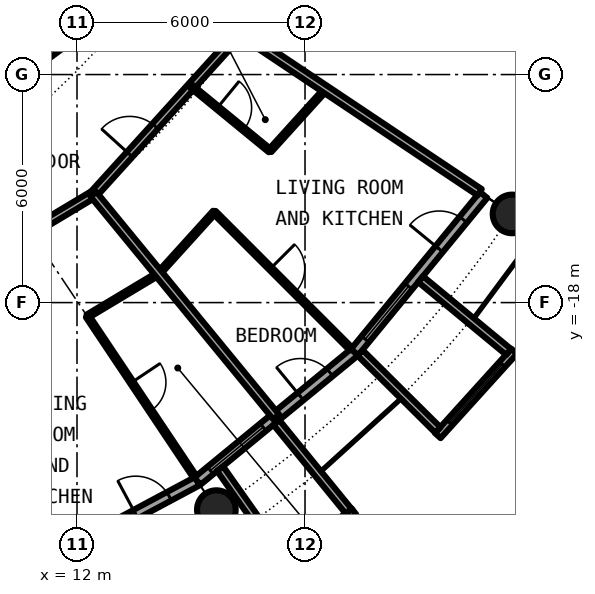
"""IFC4 building model, lengths in metres.
Left out: names, types, materials, properties, quantities, classifications, styles, units other than length and angle.
Written with IfcOpenShell. Run it as: python <this file> out.ifc"""

import sys

from ifc_helpers import new_model, si_unit, direction, frame, frame_2d, origin, origin_2d, place, context, subcontext, project, spatial, rectangle, circle, hollow_circle, extrude, element, fill, save


model = new_model("IFC4")
c1 = context("Model", 3, precision=1e-05, world=origin(), true_north=direction((0.0, 1.0)))
c2 = subcontext(c1, "Body", "Model", "MODEL_VIEW")
j1 = project(units=[si_unit("LENGTHUNIT", "METRE"), si_unit("PLANEANGLEUNIT", "RADIAN")], contexts=[c1])
p1 = place(None, origin())
s1 = spatial("IfcSite", under=j1, at=p1, CompositionType="ELEMENT")
p2 = place(p1, origin())
s2 = spatial("IfcBuilding", under=s1, at=p2, CompositionType="ELEMENT")
p3 = place(p2, frame((0.0, 0.0, 75.8)))
s3 = spatial("IfcBuildingStorey", under=s2, at=p3, CompositionType="ELEMENT", Elevation=75.8)
for number, where, z_axis, x_axis in (
    (1, (15.667, -23.448, 0.0), (0.0, 0.0, 1.0), (1.0, 0.0, 0.0)),
    (2, (23.448, -15.667, 0.0), (0.0, 0.0, 1.0), (1.0, 0.0, 0.0)),
):
    element("IfcColumn", number, at=place(p3, frame(where, z_axis=z_axis, x_axis=x_axis)), inside=s3, PredefinedType="COLUMN", context=c2, shape_type="SweptSolid", body=[
        extrude(hollow_circle(Radius=0.508, WallThickness=0.04, at=origin_2d()), origin(), (0.0, 0.0, 1.0), 3.05),
    ])
p4 = place(p3, frame((10.447, -25.222, 0.0), z_axis=(0.0, 0.0, 1.0), x_axis=(0.881915646801, 0.471407246368, 0.0)))
e3 = element("IfcWall", 3, at=p4, inside=s3, PredefinedType="SOLIDWALL", context=c2, shape_type="SweptSolid", body=[
    extrude(rectangle(XDim=5.352, YDim=0.25, at=frame_2d((2.676, 0.0))), origin(), (0.0, 0.0, 1.0), 2.7),
])
p5 = place(p4, frame((0.441, 0.0, 0.3)))
e4 = element("IfcOpeningElement", 4, at=p5, cuts=e3, PredefinedType="OPENING", context=c2, shape_type="SweptSolid", body=[
    extrude(rectangle(XDim=1.8, YDim=2.1, at=frame_2d((0.9, 1.05))), frame((0.0, 0.135, 0.0), z_axis=(0.0, -1.0, 0.0), x_axis=(1.0, 0.0, 0.0)), (0.0, 0.0, 1.0), 0.27),
])
p6 = place(p4, frame((3.51, 0.0, 0.0)))
e5 = element("IfcOpeningElement", 5, at=p6, cuts=e3, PredefinedType="OPENING", context=c2, shape_type="SweptSolid", body=[
    extrude(rectangle(XDim=1.0, YDim=2.2, at=frame_2d((0.5, 1.1))), frame((0.0, 0.135, 0.0), z_axis=(0.0, -1.0, 0.0), x_axis=(1.0, 0.0, 0.0)), (0.0, 0.0, 1.0), 0.27),
])
p7 = place(p3, frame((15.167, -22.699, 0.0), z_axis=(0.0, 0.0, 1.0), x_axis=(0.773019449054, 0.634382322723, 0.0)))
e6 = element("IfcWall", 6, at=p7, inside=s3, PredefinedType="SOLIDWALL", context=c2, shape_type="SweptSolid", body=[
    extrude(rectangle(XDim=5.352, YDim=0.25, at=frame_2d((2.676, 0.0))), origin(), (0.0, 0.0, 1.0), 2.7),
])
p8 = place(p7, frame((0.441, 0.0, 0.3)))
e7 = element("IfcOpeningElement", 7, at=p8, cuts=e6, PredefinedType="OPENING", context=c2, shape_type="SweptSolid", body=[
    extrude(rectangle(XDim=1.8, YDim=2.1, at=frame_2d((0.9, 1.05))), frame((0.0, 0.135, 0.0), z_axis=(0.0, -1.0, 0.0), x_axis=(1.0, 0.0, 0.0)), (0.0, 0.0, 1.0), 0.27),
])
p9 = place(p7, frame((3.51, 0.0, 0.0)))
e8 = element("IfcOpeningElement", 8, at=p9, cuts=e6, PredefinedType="OPENING", context=c2, shape_type="SweptSolid", body=[
    extrude(rectangle(XDim=1.0, YDim=2.2, at=frame_2d((0.5, 1.1))), frame((0.0, 0.135, 0.0), z_axis=(0.0, -1.0, 0.0), x_axis=(1.0, 0.0, 0.0)), (0.0, 0.0, 1.0), 0.27),
])
p10 = place(p3, frame((17.427, -24.909, -0.03), z_axis=(0.0, 0.0, 1.0), x_axis=(0.796842165306, 0.60418752353, 0.0)))
e9 = element("IfcWall", 9, at=p10, inside=s3, PredefinedType="SOLIDWALL", context=c2, shape_type="SweptSolid", body=[
    extrude(rectangle(XDim=2.337, YDim=0.2, at=frame_2d((1.168, 0.0))), origin(), (0.0, 0.0, 1.0), 2.73),
])
p11 = place(p10, frame((0.128, 0.0, 0.33)))
e10 = element("IfcOpeningElement", 10, at=p11, cuts=e9, PredefinedType="OPENING", context=c2, shape_type="SweptSolid", body=[
    extrude(circle(Radius=1.04, at=frame_2d((1.04, 1.04))), frame((0.0, 0.11, 0.0), z_axis=(0.0, -1.0, 0.0), x_axis=(1.0, 0.0, 0.0)), (0.0, 0.0, 1.0), 0.22),
])
p12 = place(p3, frame((15.765, -22.37, -0.03), z_axis=(0.0, 0.0, 1.0), x_axis=(0.576274612209, -0.817256123454, 0.0)))
e11 = element("IfcWall", 11, at=p12, inside=s3, PredefinedType="SOLIDWALL", context=c2, shape_type="SweptSolid", body=[
    extrude(rectangle(XDim=2.933, YDim=0.2, at=frame_2d((1.466, 0.0))), origin(), (0.0, 0.0, 1.0), 2.73),
])
p13 = place(p3, frame((17.246, -21.155, -0.03), z_axis=(0.0, 0.0, 1.0), x_axis=(0.631741648902, -0.775179004516, 0.0)))
e12 = element("IfcWall", 12, at=p13, inside=s3, PredefinedType="SOLIDWALL", context=c2, shape_type="SweptSolid", body=[
    extrude(rectangle(XDim=3.006, YDim=0.2, at=frame_2d((1.503, 0.0))), origin(), (0.0, 0.0, 1.0), 2.73),
])
p14 = place(p3, frame((19.304, -19.304, 0.0), z_axis=(0.0, 0.0, 1.0), x_axis=(0.634382322723, 0.773019449054, 0.0)))
e13 = element("IfcWall", 13, at=p14, inside=s3, PredefinedType="SOLIDWALL", context=c2, shape_type="SweptSolid", body=[
    extrude(rectangle(XDim=5.352, YDim=0.25, at=frame_2d((2.676, 0.0))), origin(), (0.0, 0.0, 1.0), 2.7),
])
p15 = place(p14, frame((0.441, 0.0, 0.3)))
e14 = element("IfcOpeningElement", 14, at=p15, cuts=e13, PredefinedType="OPENING", context=c2, shape_type="SweptSolid", body=[
    extrude(rectangle(XDim=1.8, YDim=2.1, at=frame_2d((0.9, 1.05))), frame((0.0, 0.135, 0.0), z_axis=(0.0, -1.0, 0.0), x_axis=(1.0, 0.0, 0.0)), (0.0, 0.0, 1.0), 0.27),
])
p16 = place(p14, frame((3.51, 0.0, 0.0)))
e15 = element("IfcOpeningElement", 15, at=p16, cuts=e13, PredefinedType="OPENING", context=c2, shape_type="SweptSolid", body=[
    extrude(rectangle(XDim=1.0, YDim=2.2, at=frame_2d((0.5, 1.1))), frame((0.0, 0.135, 0.0), z_axis=(0.0, -1.0, 0.0), x_axis=(1.0, 0.0, 0.0)), (0.0, 0.0, 1.0), 0.27),
])
p17 = place(p3, frame((21.493, -21.5, -0.03), z_axis=(0.0, 0.0, 1.0), x_axis=(0.671506829416, 0.740998365753, 0.0)))
e16 = element("IfcWall", 16, at=p17, inside=s3, PredefinedType="SOLIDWALL", context=c2, shape_type="SweptSolid", body=[
    extrude(rectangle(XDim=2.993, YDim=0.2, at=frame_2d((1.497, 0.0))), origin(), (0.0, 0.0, 1.0), 2.73),
])
p18 = place(p17, frame((0.457, 0.0, 0.33)))
e17 = element("IfcOpeningElement", 17, at=p18, cuts=e16, PredefinedType="OPENING", context=c2, shape_type="SweptSolid", body=[
    extrude(circle(Radius=1.04, at=frame_2d((1.04, 1.04))), frame((0.0, 0.11, 0.0), z_axis=(0.0, -1.0, 0.0), x_axis=(1.0, 0.0, 0.0)), (0.0, 0.0, 1.0), 0.22),
])
p19 = place(p3, frame((19.45, -19.323, -0.03), z_axis=(0.0, 0.0, 1.0), x_axis=(0.709727076896, -0.704476739375, 0.0)))
e18 = element("IfcWall", 18, at=p19, inside=s3, PredefinedType="SOLIDWALL", context=c2, shape_type="SweptSolid", body=[
    extrude(rectangle(XDim=2.883, YDim=0.2, at=frame_2d((1.441, 0.0))), origin(), (0.0, 0.0, 1.0), 2.73),
])
p20 = place(p3, frame((21.041, -17.384, -0.03), z_axis=(0.0, 0.0, 1.0), x_axis=(0.770784861449, -0.63709551667, 0.0)))
e19 = element("IfcWall", 19, at=p20, inside=s3, PredefinedType="SOLIDWALL", context=c2, shape_type="SweptSolid", body=[
    extrude(rectangle(XDim=3.006, YDim=0.2, at=frame_2d((1.503, 0.0))), origin(), (0.0, 0.0, 1.0), 2.73),
])
p21 = place(p3, frame((12.276, -18.36, 0.0), z_axis=(0.0, 0.0, 1.0), x_axis=(0.857611386679, 0.514298268943, 0.0)))
e20 = element("IfcWall", 20, at=p21, inside=s3, PredefinedType="PARTITIONING", context=c2, shape_type="SweptSolid", body=[
    extrude(rectangle(XDim=2.182, YDim=0.1, at=frame_2d((1.091, 0.0))), origin(), (0.0, 0.0, 1.0), 2.7),
])
p22 = place(p3, frame((14.153, -17.234, 0.0), z_axis=(0.0, 0.0, 1.0), x_axis=(0.671144831591, 0.741326254107, 0.0)))
e21 = element("IfcWall", 21, at=p22, inside=s3, PredefinedType="PARTITIONING", context=c2, shape_type="SweptSolid", body=[
    extrude(rectangle(XDim=2.181, YDim=0.1, at=frame_2d((1.091, 0.0))), origin(), (0.0, 0.0, 1.0), 2.7),
])
p23 = place(p3, frame((17.077, -14.006, 0.0), z_axis=(0.0, 0.0, 1.0), x_axis=(0.671396556615, 0.741098282123, 0.0)))
e22 = element("IfcWall", 22, at=p23, inside=s3, PredefinedType="PARTITIONING", context=c2, shape_type="SweptSolid", body=[
    extrude(rectangle(XDim=2.182, YDim=0.1, at=frame_2d((1.091, 0.0))), origin(), (0.0, 0.0, 1.0), 2.7),
])
p24 = place(p3, frame((10.916, -16.061, 0.0), z_axis=(0.0, 0.0, 1.0), x_axis=(0.857663265693, 0.514211748875, 0.0)))
e23 = element("IfcWall", 23, at=p24, inside=s3, PredefinedType="PARTITIONING", context=c2, shape_type="SweptSolid", body=[
    extrude(rectangle(XDim=1.77, YDim=0.2, at=frame_2d((0.885, 0.0))), origin(), (0.0, 0.0, 1.0), 2.38),
])
p25 = place(p3, frame((12.434, -15.151, 0.0), z_axis=(0.0, 0.0, 1.0), x_axis=(0.671601747072, 0.740912338492, 0.0)))
e24 = element("IfcWall", 24, at=p25, inside=s3, PredefinedType="PARTITIONING", context=c2, shape_type="SweptSolid", body=[
    extrude(rectangle(XDim=5.597, YDim=0.2, at=frame_2d((2.799, 0.0))), origin(), (0.0, 0.0, 1.0), 2.38),
])
p26 = place(p25, frame((1.417, 0.0, 0.0)))
e25 = element("IfcOpeningElement", 25, at=p26, cuts=e24, PredefinedType="OPENING", context=c2, shape_type="SweptSolid", body=[
    extrude(rectangle(XDim=1.0, YDim=2.3, at=frame_2d((0.5, 1.15))), frame((0.0, 0.11, 0.0), z_axis=(0.0, -1.0, 0.0), x_axis=(1.0, 0.0, 0.0)), (0.0, 0.0, 1.0), 0.22),
])
p27 = place(p3, frame((4.906, -16.172, 0.0), z_axis=(0.0, 0.0, 1.0), x_axis=(0.803191461888, 0.595720971219, 0.0)))
e26 = element("IfcWall", 26, at=p27, inside=s3, PredefinedType="PARTITIONING", context=c2, shape_type="SweptSolid", body=[
    extrude(rectangle(XDim=9.76, YDim=0.2, at=frame_2d((4.88, 0.0))), origin(), (0.0, 0.0, 1.0), 2.7),
])
p28 = place(p27, frame((4.38, 0.0, 0.0)))
e27 = element("IfcOpeningElement", 27, at=p28, cuts=e26, PredefinedType="OPENING", context=c2, shape_type="SweptSolid", body=[
    extrude(rectangle(XDim=1.0, YDim=2.3, at=frame_2d((0.5, 1.15))), frame((0.0, 0.11, 0.0), z_axis=(0.0, -1.0, 0.0), x_axis=(1.0, 0.0, 0.0)), (0.0, 0.0, 1.0), 0.22),
])
p29 = place(p3, frame((12.276, -18.36, 0.0), z_axis=(0.0, 0.0, 1.0), x_axis=(0.555939561221, -0.831222716406, 0.0)))
e28 = element("IfcWall", 28, at=p29, inside=s3, PredefinedType="PARTITIONING", context=c2, shape_type="SweptSolid", body=[
    extrude(rectangle(XDim=5.089, YDim=0.1, at=frame_2d((2.544, 0.0))), origin(), (0.0, 0.0, 1.0), 2.7),
])
p30 = place(p29, frame((2.094, 0.0, 0.0)))
e29 = element("IfcOpeningElement", 29, at=p30, cuts=e28, PredefinedType="OPENING", context=c2, shape_type="SweptSolid", body=[
    extrude(rectangle(XDim=0.9, YDim=2.3, at=frame_2d((0.45, 1.15))), frame((0.0, 0.06, 0.0), z_axis=(0.0, -1.0, 0.0), x_axis=(1.0, 0.0, 0.0)), (0.0, 0.0, 1.0), 0.12),
])
p31 = place(p3, frame((12.434, -15.151, 0.0), z_axis=(0.0, 0.0, 1.0), x_axis=(0.634381303318, -0.773020285633, 0.0)))
e30 = element("IfcWall", 30, at=p31, inside=s3, PredefinedType="PARTITIONING", context=c2, shape_type="SweptSolid", body=[
    extrude(rectangle(XDim=7.576, YDim=0.2, at=frame_2d((3.788, 0.0))), origin(), (0.0, 0.0, 1.0), 2.7),
])
p32 = place(p3, frame((15.009, -12.31, 0.0), z_axis=(0.0, 0.0, 1.0), x_axis=(0.77319617123, -0.634166918717, 0.0)))
e31 = element("IfcWall", 31, at=p32, inside=s3, PredefinedType="PARTITIONING", context=c2, shape_type="SweptSolid", body=[
    extrude(rectangle(XDim=2.675, YDim=0.1, at=frame_2d((1.337, 0.0))), origin(), (0.0, 0.0, 1.0), 2.7),
])
p33 = place(p32, frame((0.887, 0.0, 0.0)))
e32 = element("IfcOpeningElement", 32, at=p33, cuts=e31, PredefinedType="OPENING", context=c2, shape_type="SweptSolid", body=[
    extrude(rectangle(XDim=0.9, YDim=2.3, at=frame_2d((0.45, 1.15))), frame((0.0, 0.06, 0.0), z_axis=(0.0, -1.0, 0.0), x_axis=(1.0, 0.0, 0.0)), (0.0, 0.0, 1.0), 0.12),
])
p34 = place(p3, frame((15.612, -15.622, 0.0), z_axis=(0.0, 0.0, 1.0), x_axis=(0.706914880313, -0.707298629994, 0.0)))
e33 = element("IfcWall", 33, at=p34, inside=s3, PredefinedType="PARTITIONING", context=c2, shape_type="SweptSolid", body=[
    extrude(rectangle(XDim=5.09, YDim=0.1, at=frame_2d((2.545, 0.0))), origin(), (0.0, 0.0, 1.0), 2.7),
])
p35 = place(p34, frame((2.095, 0.0, 0.0)))
e34 = element("IfcOpeningElement", 34, at=p35, cuts=e33, PredefinedType="OPENING", context=c2, shape_type="SweptSolid", body=[
    extrude(rectangle(XDim=0.9, YDim=2.3, at=frame_2d((0.45, 1.15))), frame((0.0, 0.06, 0.0), z_axis=(0.0, -1.0, 0.0), x_axis=(1.0, 0.0, 0.0)), (0.0, 0.0, 1.0), 0.12),
])
p36 = place(p3, frame((16.515, -11.035, 0.0), z_axis=(0.0, 0.0, 1.0), x_axis=(0.831505405283, -0.555516661303, 0.0)))
e35 = element("IfcWall", 35, at=p36, inside=s3, PredefinedType="PARTITIONING", context=c2, shape_type="SweptSolid", body=[
    extrude(rectangle(XDim=7.312, YDim=0.2, at=frame_2d((3.656, 0.0))), origin(), (0.0, 0.0, 1.0), 2.7),
])
p37 = place(p6, origin())
e36 = element("IfcDoor", 36, at=p37, inside=s3, OperationType="SINGLE_SWING_LEFT", PredefinedType="DOOR", context=c2, shape_type="SweptSolid", body=[
    extrude(rectangle(XDim=1.0, YDim=2.2, at=frame_2d((0.5, 1.1))), frame((0.0, 0.025, 0.0), z_axis=(0.0, -1.0, 0.0), x_axis=(1.0, 0.0, 0.0)), (0.0, 0.0, 1.0), 0.05),
])
fill(e5, e36)
p38 = place(p8, origin())
e37 = element("IfcWindow", 37, at=p38, inside=s3, PartitioningType="SINGLE_PANEL", PredefinedType="WINDOW", context=c2, shape_type="SweptSolid", body=[
    extrude(rectangle(XDim=1.8, YDim=2.1, at=frame_2d((0.9, 1.05))), frame((0.0, 0.03, 0.0), z_axis=(0.0, -1.0, 0.0), x_axis=(1.0, 0.0, 0.0)), (0.0, 0.0, 1.0), 0.06),
])
fill(e7, e37)
p39 = place(p11, origin())
e38 = element("IfcWindow", 38, at=p39, inside=s3, PartitioningType="SINGLE_PANEL", PredefinedType="WINDOW", context=c2, shape_type="SweptSolid", body=[
    extrude(circle(Radius=1.04, at=frame_2d((1.04, 1.04))), frame((0.0, 0.03, 0.0), z_axis=(0.0, -1.0, 0.0), x_axis=(1.0, 0.0, 0.0)), (0.0, 0.0, 1.0), 0.06),
])
fill(e10, e38)
p40 = place(p9, origin())
e39 = element("IfcDoor", 39, at=p40, inside=s3, OperationType="SINGLE_SWING_LEFT", PredefinedType="DOOR", context=c2, shape_type="SweptSolid", body=[
    extrude(rectangle(XDim=1.0, YDim=2.2, at=frame_2d((0.5, 1.1))), frame((0.0, 0.025, 0.0), z_axis=(0.0, -1.0, 0.0), x_axis=(1.0, 0.0, 0.0)), (0.0, 0.0, 1.0), 0.05),
])
fill(e8, e39)
p41 = place(p15, origin())
e40 = element("IfcWindow", 40, at=p41, inside=s3, PartitioningType="SINGLE_PANEL", PredefinedType="WINDOW", context=c2, shape_type="SweptSolid", body=[
    extrude(rectangle(XDim=1.8, YDim=2.1, at=frame_2d((0.9, 1.05))), frame((0.0, 0.03, 0.0), z_axis=(0.0, -1.0, 0.0), x_axis=(1.0, 0.0, 0.0)), (0.0, 0.0, 1.0), 0.06),
])
fill(e14, e40)
p42 = place(p18, origin())
e41 = element("IfcWindow", 41, at=p42, inside=s3, PartitioningType="SINGLE_PANEL", PredefinedType="WINDOW", context=c2, shape_type="SweptSolid", body=[
    extrude(circle(Radius=1.04, at=frame_2d((1.04, 1.04))), frame((0.0, 0.03, 0.0), z_axis=(0.0, -1.0, 0.0), x_axis=(1.0, 0.0, 0.0)), (0.0, 0.0, 1.0), 0.06),
])
fill(e17, e41)
p43 = place(p16, origin())
e42 = element("IfcDoor", 42, at=p43, inside=s3, OperationType="SINGLE_SWING_LEFT", PredefinedType="DOOR", context=c2, shape_type="SweptSolid", body=[
    extrude(rectangle(XDim=1.0, YDim=2.2, at=frame_2d((0.5, 1.1))), frame((0.0, 0.025, 0.0), z_axis=(0.0, -1.0, 0.0), x_axis=(1.0, 0.0, 0.0)), (0.0, 0.0, 1.0), 0.05),
])
fill(e15, e42)
p44 = place(p30, origin())
e43 = element("IfcDoor", 43, at=p44, inside=s3, OperationType="SINGLE_SWING_RIGHT", PredefinedType="DOOR", context=c2, shape_type="SweptSolid", body=[
    extrude(rectangle(XDim=0.9, YDim=2.3, at=frame_2d((0.45, 1.15))), frame((0.0, 0.025, 0.0), z_axis=(0.0, -1.0, 0.0), x_axis=(1.0, 0.0, 0.0)), (0.0, 0.0, 1.0), 0.05),
])
fill(e29, e43)
p45 = place(p26, origin())
e44 = element("IfcDoor", 44, at=p45, inside=s3, OperationType="SINGLE_SWING_LEFT", PredefinedType="DOOR", context=c2, shape_type="SweptSolid", body=[
    extrude(rectangle(XDim=1.0, YDim=2.3, at=frame_2d((0.5, 1.15))), frame((0.0, 0.025, 0.0), z_axis=(0.0, -1.0, 0.0), x_axis=(1.0, 0.0, 0.0)), (0.0, 0.0, 1.0), 0.05),
])
fill(e25, e44)
p46 = place(p33, origin())
e45 = element("IfcDoor", 45, at=p46, inside=s3, OperationType="SINGLE_SWING_RIGHT", PredefinedType="DOOR", context=c2, shape_type="SweptSolid", body=[
    extrude(rectangle(XDim=0.9, YDim=2.3, at=frame_2d((0.45, 1.15))), frame((0.0, 0.025, 0.0), z_axis=(0.0, -1.0, 0.0), x_axis=(1.0, 0.0, 0.0)), (0.0, 0.0, 1.0), 0.05),
])
fill(e32, e45)
p47 = place(p35, origin())
e46 = element("IfcDoor", 46, at=p47, inside=s3, OperationType="SINGLE_SWING_RIGHT", PredefinedType="DOOR", context=c2, shape_type="SweptSolid", body=[
    extrude(rectangle(XDim=0.9, YDim=2.3, at=frame_2d((0.45, 1.15))), frame((0.0, 0.025, 0.0), z_axis=(0.0, -1.0, 0.0), x_axis=(1.0, 0.0, 0.0)), (0.0, 0.0, 1.0), 0.05),
])
fill(e34, e46)
save(model, sys.argv[1])
